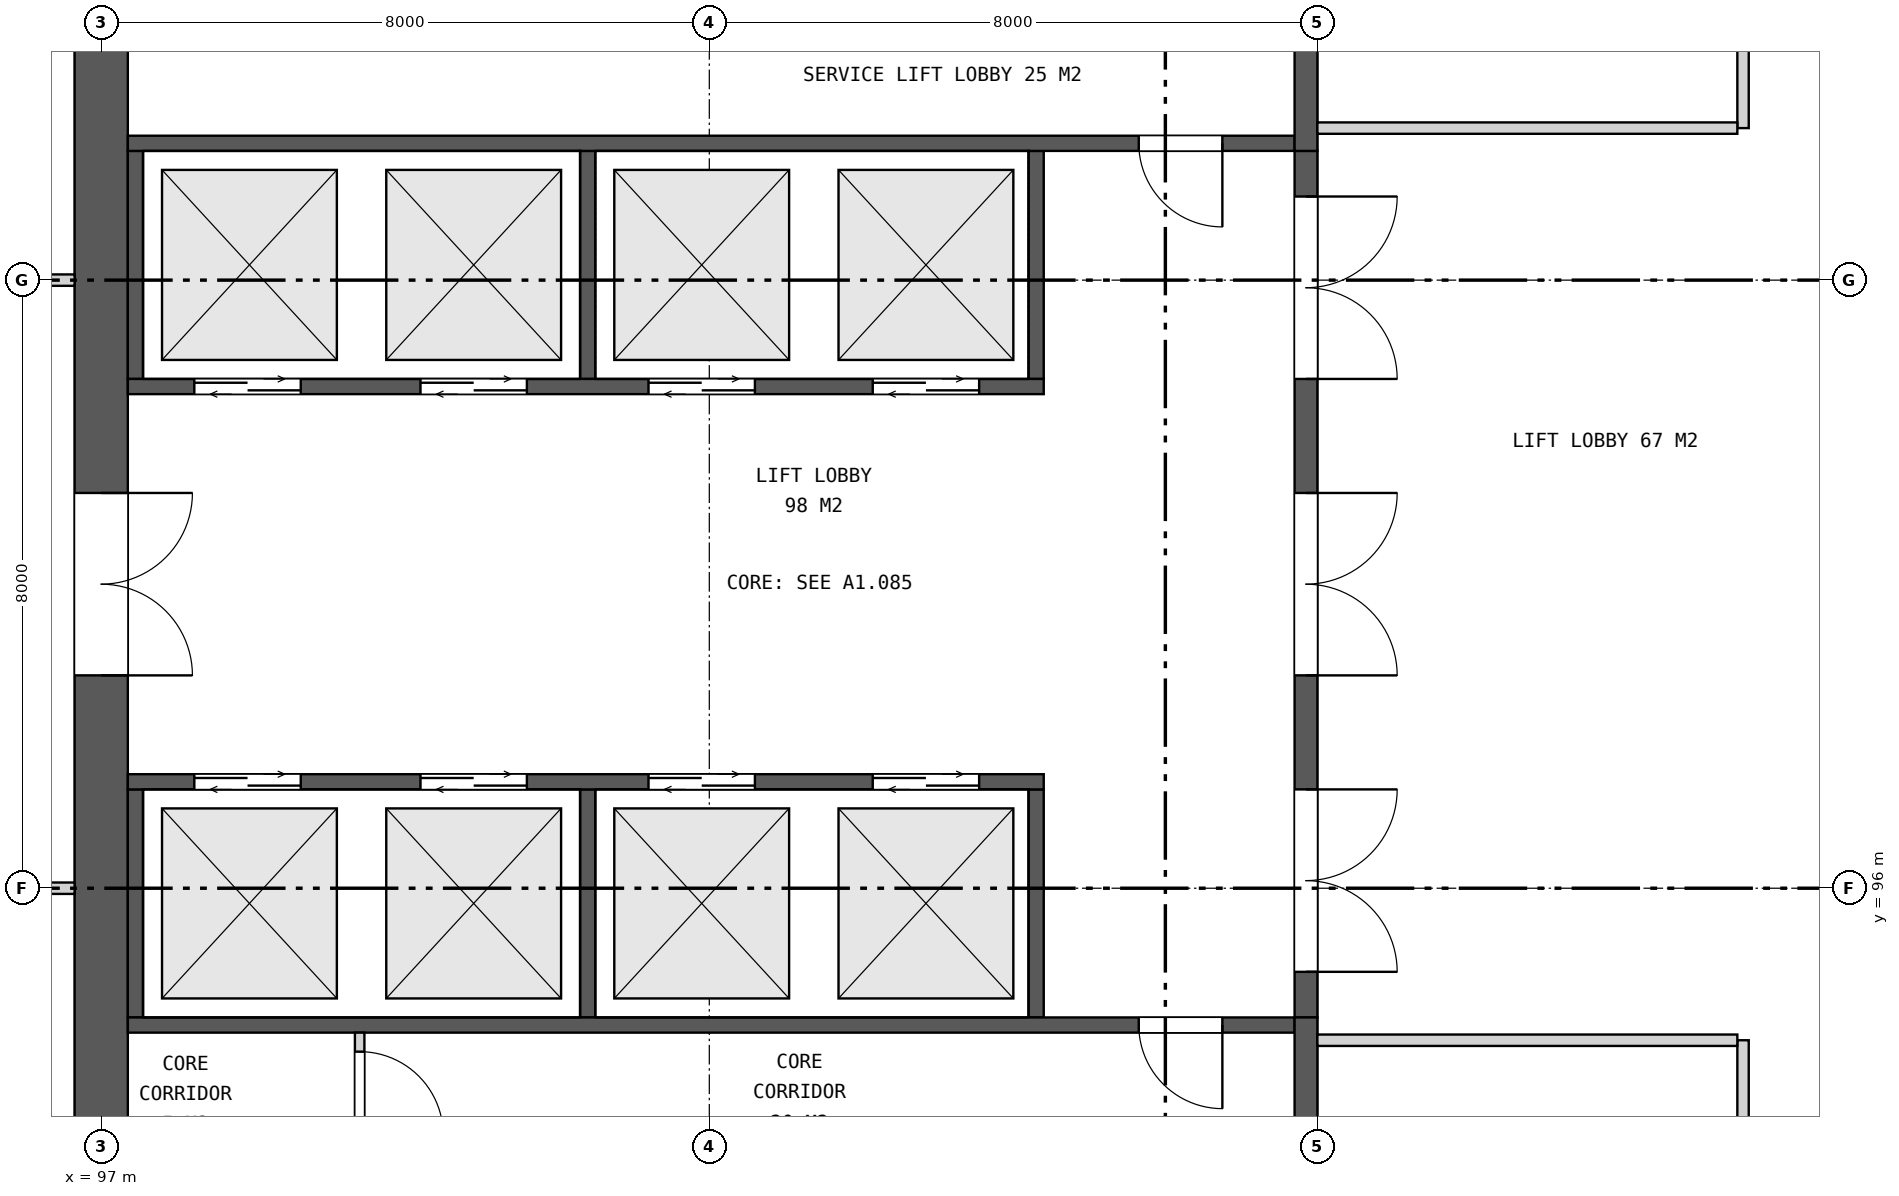
"""IFC4 building model, lengths in metres.
Left out: names, types, materials, properties, quantities, classifications, styles, units other than length and angle.
Written with IfcOpenShell. Run it as: python <this file> out.ifc"""

import sys

from ifc_helpers import new_model, si_unit, direction, frame, frame_2d, origin, place, context, subcontext, project, spatial, rectangle, extrude, element, fill, save


model = new_model("IFC4")
c1 = context("Model", 3, precision=1e-05, world=origin(), true_north=direction((0.0, 1.0)))
c2 = subcontext(c1, "Body", "Model", "MODEL_VIEW")
j1 = project(units=[si_unit("LENGTHUNIT", "METRE"), si_unit("PLANEANGLEUNIT", "RADIAN")], contexts=[c1])
p1 = place(None, origin())
s1 = spatial("IfcSite", under=j1, at=p1, CompositionType="ELEMENT")
p2 = place(p1, origin())
s2 = spatial("IfcBuilding", under=s1, at=p2, CompositionType="ELEMENT")
p3 = place(p2, frame((0.0, 0.0, 171.5)))
s3 = spatial("IfcBuildingStorey", under=s2, at=p3, CompositionType="ELEMENT", Elevation=171.5)
p4 = place(p3, frame((97.0, 111.65, 0.0), z_axis=(0.0, 0.0, 1.0), x_axis=(0.0, -1.0, 0.0)))
e1 = element("IfcWall", 1, at=p4, inside=s3, PredefinedType="SHEAR", context=c2, shape_type="SweptSolid", body=[
    extrude(rectangle(XDim=23.3, YDim=0.7, at=frame_2d((11.65, 0.0))), origin(), (0.0, 0.0, 1.0), 7.4),
])
p5 = place(p4, frame((10.45, 0.0, 0.0)))
e2 = element("IfcOpeningElement", 2, at=p5, cuts=e1, PredefinedType="OPENING", context=c2, shape_type="SweptSolid", body=[
    extrude(rectangle(XDim=2.4, YDim=2.4, at=frame_2d((1.2, 1.2))), frame((0.0, 0.36, 0.0), z_axis=(0.0, -1.0, 0.0), x_axis=(1.0, 0.0, 0.0)), (0.0, 0.0, 1.0), 0.72),
])
p6 = place(p3, frame((112.85, 105.7, 0.0), z_axis=(0.0, 0.0, 1.0), x_axis=(0.0, -1.0, 0.0)))
e3 = element("IfcWall", 3, at=p6, inside=s3, PredefinedType="SHEAR", context=c2, shape_type="SweptSolid", body=[
    extrude(rectangle(XDim=11.4, YDim=0.3, at=frame_2d((5.7, 0.0))), origin(), (0.0, 0.0, 1.0), 7.4),
])
p7 = place(p6, frame((0.6, 0.0, 0.0)))
e4 = element("IfcOpeningElement", 4, at=p7, cuts=e3, PredefinedType="OPENING", context=c2, shape_type="SweptSolid", body=[
    extrude(rectangle(XDim=2.4, YDim=2.4, at=frame_2d((1.2, 1.2))), frame((0.0, 0.16, 0.0), z_axis=(0.0, -1.0, 0.0), x_axis=(1.0, 0.0, 0.0)), (0.0, 0.0, 1.0), 0.32),
])
p8 = place(p6, frame((4.5, 0.0, 0.0)))
e5 = element("IfcOpeningElement", 5, at=p8, cuts=e3, PredefinedType="OPENING", context=c2, shape_type="SweptSolid", body=[
    extrude(rectangle(XDim=2.4, YDim=2.4, at=frame_2d((1.2, 1.2))), frame((0.0, 0.16, 0.0), z_axis=(0.0, -1.0, 0.0), x_axis=(1.0, 0.0, 0.0)), (0.0, 0.0, 1.0), 0.32),
])
p9 = place(p6, frame((8.4, 0.0, 0.0)))
e6 = element("IfcOpeningElement", 6, at=p9, cuts=e3, PredefinedType="OPENING", context=c2, shape_type="SweptSolid", body=[
    extrude(rectangle(XDim=2.4, YDim=2.4, at=frame_2d((1.2, 1.2))), frame((0.0, 0.16, 0.0), z_axis=(0.0, -1.0, 0.0), x_axis=(1.0, 0.0, 0.0)), (0.0, 0.0, 1.0), 0.32),
])
for number, where, z_axis, x_axis in (
    (7, (109.3, 97.3, 0.0), (0.0, 0.0, 1.0), (0.0, -1.0, 0.0)),
    (8, (103.4, 97.3, 0.0), (0.0, 0.0, 1.0), (0.0, -1.0, 0.0)),
    (9, (97.45, 97.3, 0.0), (0.0, 0.0, 1.0), (0.0, -1.0, 0.0)),
):
    element("IfcWall", number, at=place(p3, frame(where, z_axis=z_axis, x_axis=x_axis)), inside=s3, PredefinedType="SHEAR", context=c2, shape_type="SweptSolid", body=[
        extrude(rectangle(XDim=3.0, YDim=0.2, at=frame_2d((1.5, 0.0))), origin(), (0.0, 0.0, 1.0), 7.4),
    ])
p10 = place(p3, frame((109.4, 97.4, 0.0), z_axis=(0.0, 0.0, 1.0), x_axis=(-1.0, 0.0, 0.0)))
e10 = element("IfcWall", 10, at=p10, inside=s3, PredefinedType="SHEAR", context=c2, shape_type="SweptSolid", body=[
    extrude(rectangle(XDim=12.05, YDim=0.2, at=frame_2d((6.025, 0.0))), origin(), (0.0, 0.0, 1.0), 7.4),
])
p11 = place(p10, frame((0.85, 0.0, 0.0)))
e11 = element("IfcOpeningElement", 11, at=p11, cuts=e10, PredefinedType="OPENING", context=c2, shape_type="SweptSolid", body=[
    extrude(rectangle(XDim=1.4, YDim=2.1, at=frame_2d((0.7, 1.05))), frame((0.0, 0.11, 0.0), z_axis=(0.0, -1.0, 0.0), x_axis=(1.0, 0.0, 0.0)), (0.0, 0.0, 1.0), 0.22),
])
p12 = place(p10, frame((3.8, 0.0, 0.0)))
e12 = element("IfcOpeningElement", 12, at=p12, cuts=e10, PredefinedType="OPENING", context=c2, shape_type="SweptSolid", body=[
    extrude(rectangle(XDim=1.4, YDim=2.1, at=frame_2d((0.7, 1.05))), frame((0.0, 0.11, 0.0), z_axis=(0.0, -1.0, 0.0), x_axis=(1.0, 0.0, 0.0)), (0.0, 0.0, 1.0), 0.22),
])
p13 = place(p10, frame((6.8, 0.0, 0.0)))
e13 = element("IfcOpeningElement", 13, at=p13, cuts=e10, PredefinedType="OPENING", context=c2, shape_type="SweptSolid", body=[
    extrude(rectangle(XDim=1.4, YDim=2.1, at=frame_2d((0.7, 1.05))), frame((0.0, 0.11, 0.0), z_axis=(0.0, -1.0, 0.0), x_axis=(1.0, 0.0, 0.0)), (0.0, 0.0, 1.0), 0.22),
])
p14 = place(p10, frame((9.775, 0.0, 0.0)))
e14 = element("IfcOpeningElement", 14, at=p14, cuts=e10, PredefinedType="OPENING", context=c2, shape_type="SweptSolid", body=[
    extrude(rectangle(XDim=1.4, YDim=2.1, at=frame_2d((0.7, 1.05))), frame((0.0, 0.11, 0.0), z_axis=(0.0, -1.0, 0.0), x_axis=(1.0, 0.0, 0.0)), (0.0, 0.0, 1.0), 0.22),
])
for number, where, z_axis, x_axis in (
    (15, (109.3, 105.7, 0.0), (0.0, 0.0, 1.0), (0.0, -1.0, 0.0)),
    (16, (103.4, 105.7, 0.0), (0.0, 0.0, 1.0), (0.0, -1.0, 0.0)),
    (17, (97.45, 105.7, 0.0), (0.0, 0.0, 1.0), (0.0, -1.0, 0.0)),
):
    element("IfcWall", number, at=place(p3, frame(where, z_axis=z_axis, x_axis=x_axis)), inside=s3, PredefinedType="SHEAR", context=c2, shape_type="SweptSolid", body=[
        extrude(rectangle(XDim=3.0, YDim=0.2, at=frame_2d((1.5, 0.0))), origin(), (0.0, 0.0, 1.0), 7.4),
    ])
p15 = place(p3, frame((109.4, 102.6, 0.0), z_axis=(0.0, 0.0, 1.0), x_axis=(-1.0, 0.0, 0.0)))
e18 = element("IfcWall", 18, at=p15, inside=s3, PredefinedType="SHEAR", context=c2, shape_type="SweptSolid", body=[
    extrude(rectangle(XDim=12.05, YDim=0.2, at=frame_2d((6.025, 0.0))), origin(), (0.0, 0.0, 1.0), 7.4),
])
p16 = place(p15, frame((0.85, 0.0, 0.0)))
e19 = element("IfcOpeningElement", 19, at=p16, cuts=e18, PredefinedType="OPENING", context=c2, shape_type="SweptSolid", body=[
    extrude(rectangle(XDim=1.4, YDim=2.1, at=frame_2d((0.7, 1.05))), frame((0.0, 0.11, 0.0), z_axis=(0.0, -1.0, 0.0), x_axis=(1.0, 0.0, 0.0)), (0.0, 0.0, 1.0), 0.22),
])
p17 = place(p15, frame((3.8, 0.0, 0.0)))
e20 = element("IfcOpeningElement", 20, at=p17, cuts=e18, PredefinedType="OPENING", context=c2, shape_type="SweptSolid", body=[
    extrude(rectangle(XDim=1.4, YDim=2.1, at=frame_2d((0.7, 1.05))), frame((0.0, 0.11, 0.0), z_axis=(0.0, -1.0, 0.0), x_axis=(1.0, 0.0, 0.0)), (0.0, 0.0, 1.0), 0.22),
])
p18 = place(p15, frame((6.8, 0.0, 0.0)))
e21 = element("IfcOpeningElement", 21, at=p18, cuts=e18, PredefinedType="OPENING", context=c2, shape_type="SweptSolid", body=[
    extrude(rectangle(XDim=1.4, YDim=2.1, at=frame_2d((0.7, 1.05))), frame((0.0, 0.11, 0.0), z_axis=(0.0, -1.0, 0.0), x_axis=(1.0, 0.0, 0.0)), (0.0, 0.0, 1.0), 0.22),
])
p19 = place(p15, frame((9.775, 0.0, 0.0)))
e22 = element("IfcOpeningElement", 22, at=p19, cuts=e18, PredefinedType="OPENING", context=c2, shape_type="SweptSolid", body=[
    extrude(rectangle(XDim=1.4, YDim=2.1, at=frame_2d((0.7, 1.05))), frame((0.0, 0.11, 0.0), z_axis=(0.0, -1.0, 0.0), x_axis=(1.0, 0.0, 0.0)), (0.0, 0.0, 1.0), 0.22),
])
p20 = place(p3, frame((112.7, 94.2, 0.0), z_axis=(0.0, 0.0, 1.0), x_axis=(-1.0, 0.0, 0.0)))
e23 = element("IfcWall", 23, at=p20, inside=s3, PredefinedType="SHEAR", context=c2, shape_type="SweptSolid", body=[
    extrude(rectangle(XDim=15.35, YDim=0.2, at=frame_2d((7.675, 0.0))), origin(), (0.0, 0.0, 1.0), 7.4),
])
p21 = place(p20, frame((0.95, 0.0, 0.0)))
e24 = element("IfcOpeningElement", 24, at=p21, cuts=e23, PredefinedType="OPENING", context=c2, shape_type="SweptSolid", body=[
    extrude(rectangle(XDim=1.1, YDim=2.1, at=frame_2d((0.55, 1.05))), frame((0.0, 0.11, 0.0), z_axis=(0.0, -1.0, 0.0), x_axis=(1.0, 0.0, 0.0)), (0.0, 0.0, 1.0), 0.22),
])
p22 = place(p3, frame((112.85, 94.3, 0.0), z_axis=(0.0, 0.0, 1.0), x_axis=(0.0, -1.0, 0.0)))
e25 = element("IfcWall", 25, at=p22, inside=s3, PredefinedType="SHEAR", context=c2, shape_type="SweptSolid", body=[
    extrude(rectangle(XDim=5.95, YDim=0.3, at=frame_2d((2.975, 0.0))), origin(), (0.0, 0.0, 1.0), 7.4),
])
p23 = place(p3, frame((100.4, 94.1, 0.0), z_axis=(0.0, 0.0, 1.0), x_axis=(0.0, -1.0, 0.0)))
e26 = element("IfcWall", 26, at=p23, inside=s3, PredefinedType="PARTITIONING", context=c2, shape_type="SweptSolid", body=[
    extrude(rectangle(XDim=1.6, YDim=0.125, at=frame_2d((0.8, 0.0))), origin(), (0.0, 0.0, 1.0), 7.4),
])
p24 = place(p23, frame((0.25, 0.0, 0.0)))
e27 = element("IfcOpeningElement", 27, at=p24, cuts=e26, PredefinedType="OPENING", context=c2, shape_type="SweptSolid", body=[
    extrude(rectangle(XDim=1.1, YDim=2.1, at=frame_2d((0.55, 1.05))), frame((0.0, 0.073, 0.0), z_axis=(0.0, -1.0, 0.0), x_axis=(1.0, 0.0, 0.0)), (0.0, 0.0, 1.0), 0.145),
])
p25 = place(p3, frame((112.7, 105.8, 0.0), z_axis=(0.0, 0.0, 1.0), x_axis=(-1.0, 0.0, 0.0)))
e28 = element("IfcWall", 28, at=p25, inside=s3, PredefinedType="SHEAR", context=c2, shape_type="SweptSolid", body=[
    extrude(rectangle(XDim=15.35, YDim=0.2, at=frame_2d((7.675, 0.0))), origin(), (0.0, 0.0, 1.0), 7.4),
])
p26 = place(p25, frame((0.95, 0.0, 0.0)))
e29 = element("IfcOpeningElement", 29, at=p26, cuts=e28, PredefinedType="OPENING", context=c2, shape_type="SweptSolid", body=[
    extrude(rectangle(XDim=1.1, YDim=2.1, at=frame_2d((0.55, 1.05))), frame((0.0, 0.11, 0.0), z_axis=(0.0, -1.0, 0.0), x_axis=(1.0, 0.0, 0.0)), (0.0, 0.0, 1.0), 0.22),
])
p27 = place(p3, frame((112.85, 111.65, 0.0), z_axis=(0.0, 0.0, 1.0), x_axis=(0.0, -1.0, 0.0)))
e30 = element("IfcWall", 30, at=p27, inside=s3, PredefinedType="SHEAR", context=c2, shape_type="SweptSolid", body=[
    extrude(rectangle(XDim=5.95, YDim=0.3, at=frame_2d((2.975, 0.0))), origin(), (0.0, 0.0, 1.0), 7.4),
])
p28 = place(p3, frame((118.6, 88.075, 0.0), z_axis=(0.0, 0.0, 1.0), x_axis=(0.0, 1.0, 0.0)))
e31 = element("IfcWall", 31, at=p28, inside=s3, PredefinedType="PARTITIONING", context=c2, shape_type="SweptSolid", body=[
    extrude(rectangle(XDim=5.925, YDim=0.15, at=frame_2d((2.962, 0.0))), origin(), (0.0, 0.0, 1.0), 6.64),
])
p29 = place(p28, frame((2.45, 0.0, 0.0)))
e32 = element("IfcOpeningElement", 32, at=p29, cuts=e31, PredefinedType="OPENING", context=c2, shape_type="SweptSolid", body=[
    extrude(rectangle(XDim=1.0, YDim=2.1, at=frame_2d((0.5, 1.05))), frame((0.0, 0.085, 0.0), z_axis=(0.0, -1.0, 0.0), x_axis=(1.0, 0.0, 0.0)), (0.0, 0.0, 1.0), 0.17),
])
p30 = place(p3, frame((118.6, 106.0, 0.0), z_axis=(0.0, 0.0, 1.0), x_axis=(0.0, 1.0, 0.0)))
e33 = element("IfcWall", 33, at=p30, inside=s3, PredefinedType="PARTITIONING", context=c2, shape_type="SweptSolid", body=[
    extrude(rectangle(XDim=5.925, YDim=0.15, at=frame_2d((2.962, 0.0))), origin(), (0.0, 0.0, 1.0), 6.64),
])
p31 = place(p30, frame((2.45, 0.0, 0.0)))
e34 = element("IfcOpeningElement", 34, at=p31, cuts=e33, PredefinedType="OPENING", context=c2, shape_type="SweptSolid", body=[
    extrude(rectangle(XDim=1.0, YDim=2.1, at=frame_2d((0.5, 1.05))), frame((0.0, 0.085, 0.0), z_axis=(0.0, -1.0, 0.0), x_axis=(1.0, 0.0, 0.0)), (0.0, 0.0, 1.0), 0.17),
])
p32 = place(p3, frame((113.0, 94.0, 0.0), z_axis=(0.0, 0.0, 1.0), x_axis=(1.0, 0.0, 0.0)))
e35 = element("IfcWall", 35, at=p32, inside=s3, PredefinedType="PARTITIONING", context=c2, shape_type="SweptSolid", body=[
    extrude(rectangle(XDim=5.525, YDim=0.15, at=frame_2d((2.762, 0.0))), origin(), (0.0, 0.0, 1.0), 6.64),
])
p33 = place(p3, frame((88.63, 96.0, 0.0), z_axis=(0.0, 0.0, 1.0), x_axis=(1.0, 0.0, 0.0)))
e36 = element("IfcWall", 36, at=p33, inside=s3, PredefinedType="PARTITIONING", context=c2, shape_type="SweptSolid", body=[
    extrude(rectangle(XDim=8.02, YDim=0.15, at=frame_2d((4.01, 0.0))), origin(), (0.0, 0.0, 1.0), 6.64),
])
p34 = place(p33, frame((3.72, 0.0, 0.0)))
e37 = element("IfcOpeningElement", 37, at=p34, cuts=e36, PredefinedType="OPENING", context=c2, shape_type="SweptSolid", body=[
    extrude(rectangle(XDim=1.0, YDim=2.1, at=frame_2d((0.5, 1.05))), frame((0.0, 0.085, 0.0), z_axis=(0.0, -1.0, 0.0), x_axis=(1.0, 0.0, 0.0)), (0.0, 0.0, 1.0), 0.17),
])
p35 = place(p3, frame((88.63, 104.0, 0.0), z_axis=(0.0, 0.0, 1.0), x_axis=(1.0, 0.0, 0.0)))
e38 = element("IfcWall", 38, at=p35, inside=s3, PredefinedType="PARTITIONING", context=c2, shape_type="SweptSolid", body=[
    extrude(rectangle(XDim=8.02, YDim=0.15, at=frame_2d((4.01, 0.0))), origin(), (0.0, 0.0, 1.0), 6.64),
])
p36 = place(p35, frame((3.72, 0.0, 0.0)))
e39 = element("IfcOpeningElement", 39, at=p36, cuts=e38, PredefinedType="OPENING", context=c2, shape_type="SweptSolid", body=[
    extrude(rectangle(XDim=1.0, YDim=2.1, at=frame_2d((0.5, 1.05))), frame((0.0, 0.085, 0.0), z_axis=(0.0, -1.0, 0.0), x_axis=(1.0, 0.0, 0.0)), (0.0, 0.0, 1.0), 0.17),
])
p37 = place(p3, frame((113.0, 106.0, 0.0), z_axis=(0.0, 0.0, 1.0), x_axis=(1.0, 0.0, 0.0)))
e40 = element("IfcWall", 40, at=p37, inside=s3, PredefinedType="PARTITIONING", context=c2, shape_type="SweptSolid", body=[
    extrude(rectangle(XDim=5.525, YDim=0.15, at=frame_2d((2.762, 0.0))), origin(), (0.0, 0.0, 1.0), 6.64),
])
p38 = place(p5, origin())
e41 = element("IfcDoor", 41, at=p38, inside=s3, OperationType="DOUBLE_DOOR_SINGLE_SWING", PredefinedType="DOOR", context=c2, shape_type="SweptSolid", body=[
    extrude(rectangle(XDim=2.4, YDim=2.4, at=frame_2d((1.2, 1.2))), frame((0.0, 0.025, 0.0), z_axis=(0.0, -1.0, 0.0), x_axis=(1.0, 0.0, 0.0)), (0.0, 0.0, 1.0), 0.05),
])
fill(e2, e41)
p39 = place(p7, origin())
e42 = element("IfcDoor", 42, at=p39, inside=s3, OperationType="DOUBLE_DOOR_SINGLE_SWING", PredefinedType="DOOR", context=c2, shape_type="SweptSolid", body=[
    extrude(rectangle(XDim=2.4, YDim=2.4, at=frame_2d((1.2, 1.2))), frame((0.0, 0.025, 0.0), z_axis=(0.0, -1.0, 0.0), x_axis=(1.0, 0.0, 0.0)), (0.0, 0.0, 1.0), 0.05),
])
fill(e4, e42)
p40 = place(p8, origin())
e43 = element("IfcDoor", 43, at=p40, inside=s3, OperationType="DOUBLE_DOOR_SINGLE_SWING", PredefinedType="DOOR", context=c2, shape_type="SweptSolid", body=[
    extrude(rectangle(XDim=2.4, YDim=2.4, at=frame_2d((1.2, 1.2))), frame((0.0, 0.025, 0.0), z_axis=(0.0, -1.0, 0.0), x_axis=(1.0, 0.0, 0.0)), (0.0, 0.0, 1.0), 0.05),
])
fill(e5, e43)
p41 = place(p9, origin())
e44 = element("IfcDoor", 44, at=p41, inside=s3, OperationType="DOUBLE_DOOR_SINGLE_SWING", PredefinedType="DOOR", context=c2, shape_type="SweptSolid", body=[
    extrude(rectangle(XDim=2.4, YDim=2.4, at=frame_2d((1.2, 1.2))), frame((0.0, 0.025, 0.0), z_axis=(0.0, -1.0, 0.0), x_axis=(1.0, 0.0, 0.0)), (0.0, 0.0, 1.0), 0.05),
])
fill(e6, e44)
p42 = place(p11, origin())
e45 = element("IfcDoor", 45, at=p42, inside=s3, OperationType="DOUBLE_DOOR_SLIDING", PredefinedType="DOOR", context=c2, shape_type="SweptSolid", body=[
    extrude(rectangle(XDim=1.4, YDim=2.1, at=frame_2d((0.7, 1.05))), frame((0.0, 0.025, 0.0), z_axis=(0.0, -1.0, 0.0), x_axis=(1.0, 0.0, 0.0)), (0.0, 0.0, 1.0), 0.05),
])
fill(e11, e45)
p43 = place(p12, origin())
e46 = element("IfcDoor", 46, at=p43, inside=s3, OperationType="DOUBLE_DOOR_SLIDING", PredefinedType="DOOR", context=c2, shape_type="SweptSolid", body=[
    extrude(rectangle(XDim=1.4, YDim=2.1, at=frame_2d((0.7, 1.05))), frame((0.0, 0.025, 0.0), z_axis=(0.0, -1.0, 0.0), x_axis=(1.0, 0.0, 0.0)), (0.0, 0.0, 1.0), 0.05),
])
fill(e12, e46)
p44 = place(p13, origin())
e47 = element("IfcDoor", 47, at=p44, inside=s3, OperationType="DOUBLE_DOOR_SLIDING", PredefinedType="DOOR", context=c2, shape_type="SweptSolid", body=[
    extrude(rectangle(XDim=1.4, YDim=2.1, at=frame_2d((0.7, 1.05))), frame((0.0, 0.025, 0.0), z_axis=(0.0, -1.0, 0.0), x_axis=(1.0, 0.0, 0.0)), (0.0, 0.0, 1.0), 0.05),
])
fill(e13, e47)
p45 = place(p14, origin())
e48 = element("IfcDoor", 48, at=p45, inside=s3, OperationType="DOUBLE_DOOR_SLIDING", PredefinedType="DOOR", context=c2, shape_type="SweptSolid", body=[
    extrude(rectangle(XDim=1.4, YDim=2.1, at=frame_2d((0.7, 1.05))), frame((0.0, 0.025, 0.0), z_axis=(0.0, -1.0, 0.0), x_axis=(1.0, 0.0, 0.0)), (0.0, 0.0, 1.0), 0.05),
])
fill(e14, e48)
p46 = place(p16, origin())
e49 = element("IfcDoor", 49, at=p46, inside=s3, OperationType="DOUBLE_DOOR_SLIDING", PredefinedType="DOOR", context=c2, shape_type="SweptSolid", body=[
    extrude(rectangle(XDim=1.4, YDim=2.1, at=frame_2d((0.7, 1.05))), frame((0.0, 0.025, 0.0), z_axis=(0.0, -1.0, 0.0), x_axis=(1.0, 0.0, 0.0)), (0.0, 0.0, 1.0), 0.05),
])
fill(e19, e49)
p47 = place(p17, origin())
e50 = element("IfcDoor", 50, at=p47, inside=s3, OperationType="DOUBLE_DOOR_SLIDING", PredefinedType="DOOR", context=c2, shape_type="SweptSolid", body=[
    extrude(rectangle(XDim=1.4, YDim=2.1, at=frame_2d((0.7, 1.05))), frame((0.0, 0.025, 0.0), z_axis=(0.0, -1.0, 0.0), x_axis=(1.0, 0.0, 0.0)), (0.0, 0.0, 1.0), 0.05),
])
fill(e20, e50)
p48 = place(p18, origin())
e51 = element("IfcDoor", 51, at=p48, inside=s3, OperationType="DOUBLE_DOOR_SLIDING", PredefinedType="DOOR", context=c2, shape_type="SweptSolid", body=[
    extrude(rectangle(XDim=1.4, YDim=2.1, at=frame_2d((0.7, 1.05))), frame((0.0, 0.025, 0.0), z_axis=(0.0, -1.0, 0.0), x_axis=(1.0, 0.0, 0.0)), (0.0, 0.0, 1.0), 0.05),
])
fill(e21, e51)
p49 = place(p19, origin())
e52 = element("IfcDoor", 52, at=p49, inside=s3, OperationType="DOUBLE_DOOR_SLIDING", PredefinedType="DOOR", context=c2, shape_type="SweptSolid", body=[
    extrude(rectangle(XDim=1.4, YDim=2.1, at=frame_2d((0.7, 1.05))), frame((0.0, 0.025, 0.0), z_axis=(0.0, -1.0, 0.0), x_axis=(1.0, 0.0, 0.0)), (0.0, 0.0, 1.0), 0.05),
])
fill(e22, e52)
p50 = place(p21, origin())
e53 = element("IfcDoor", 53, at=p50, inside=s3, OperationType="SINGLE_SWING_LEFT", PredefinedType="DOOR", context=c2, shape_type="SweptSolid", body=[
    extrude(rectangle(XDim=1.1, YDim=2.1, at=frame_2d((0.55, 1.05))), frame((0.0, 0.025, 0.0), z_axis=(0.0, -1.0, 0.0), x_axis=(1.0, 0.0, 0.0)), (0.0, 0.0, 1.0), 0.05),
])
fill(e24, e53)
p51 = place(p24, origin())
e54 = element("IfcDoor", 54, at=p51, inside=s3, OperationType="SINGLE_SWING_RIGHT", PredefinedType="DOOR", context=c2, shape_type="SweptSolid", body=[
    extrude(rectangle(XDim=1.1, YDim=2.1, at=frame_2d((0.55, 1.05))), frame((0.0, 0.025, 0.0), z_axis=(0.0, -1.0, 0.0), x_axis=(1.0, 0.0, 0.0)), (0.0, 0.0, 1.0), 0.05),
])
fill(e27, e54)
p52 = place(p26, origin())
e55 = element("IfcDoor", 55, at=p52, inside=s3, OperationType="SINGLE_SWING_LEFT", PredefinedType="DOOR", context=c2, shape_type="SweptSolid", body=[
    extrude(rectangle(XDim=1.1, YDim=2.1, at=frame_2d((0.55, 1.05))), frame((0.0, 0.025, 0.0), z_axis=(0.0, -1.0, 0.0), x_axis=(1.0, 0.0, 0.0)), (0.0, 0.0, 1.0), 0.05),
])
fill(e29, e55)
save(model, sys.argv[1])
